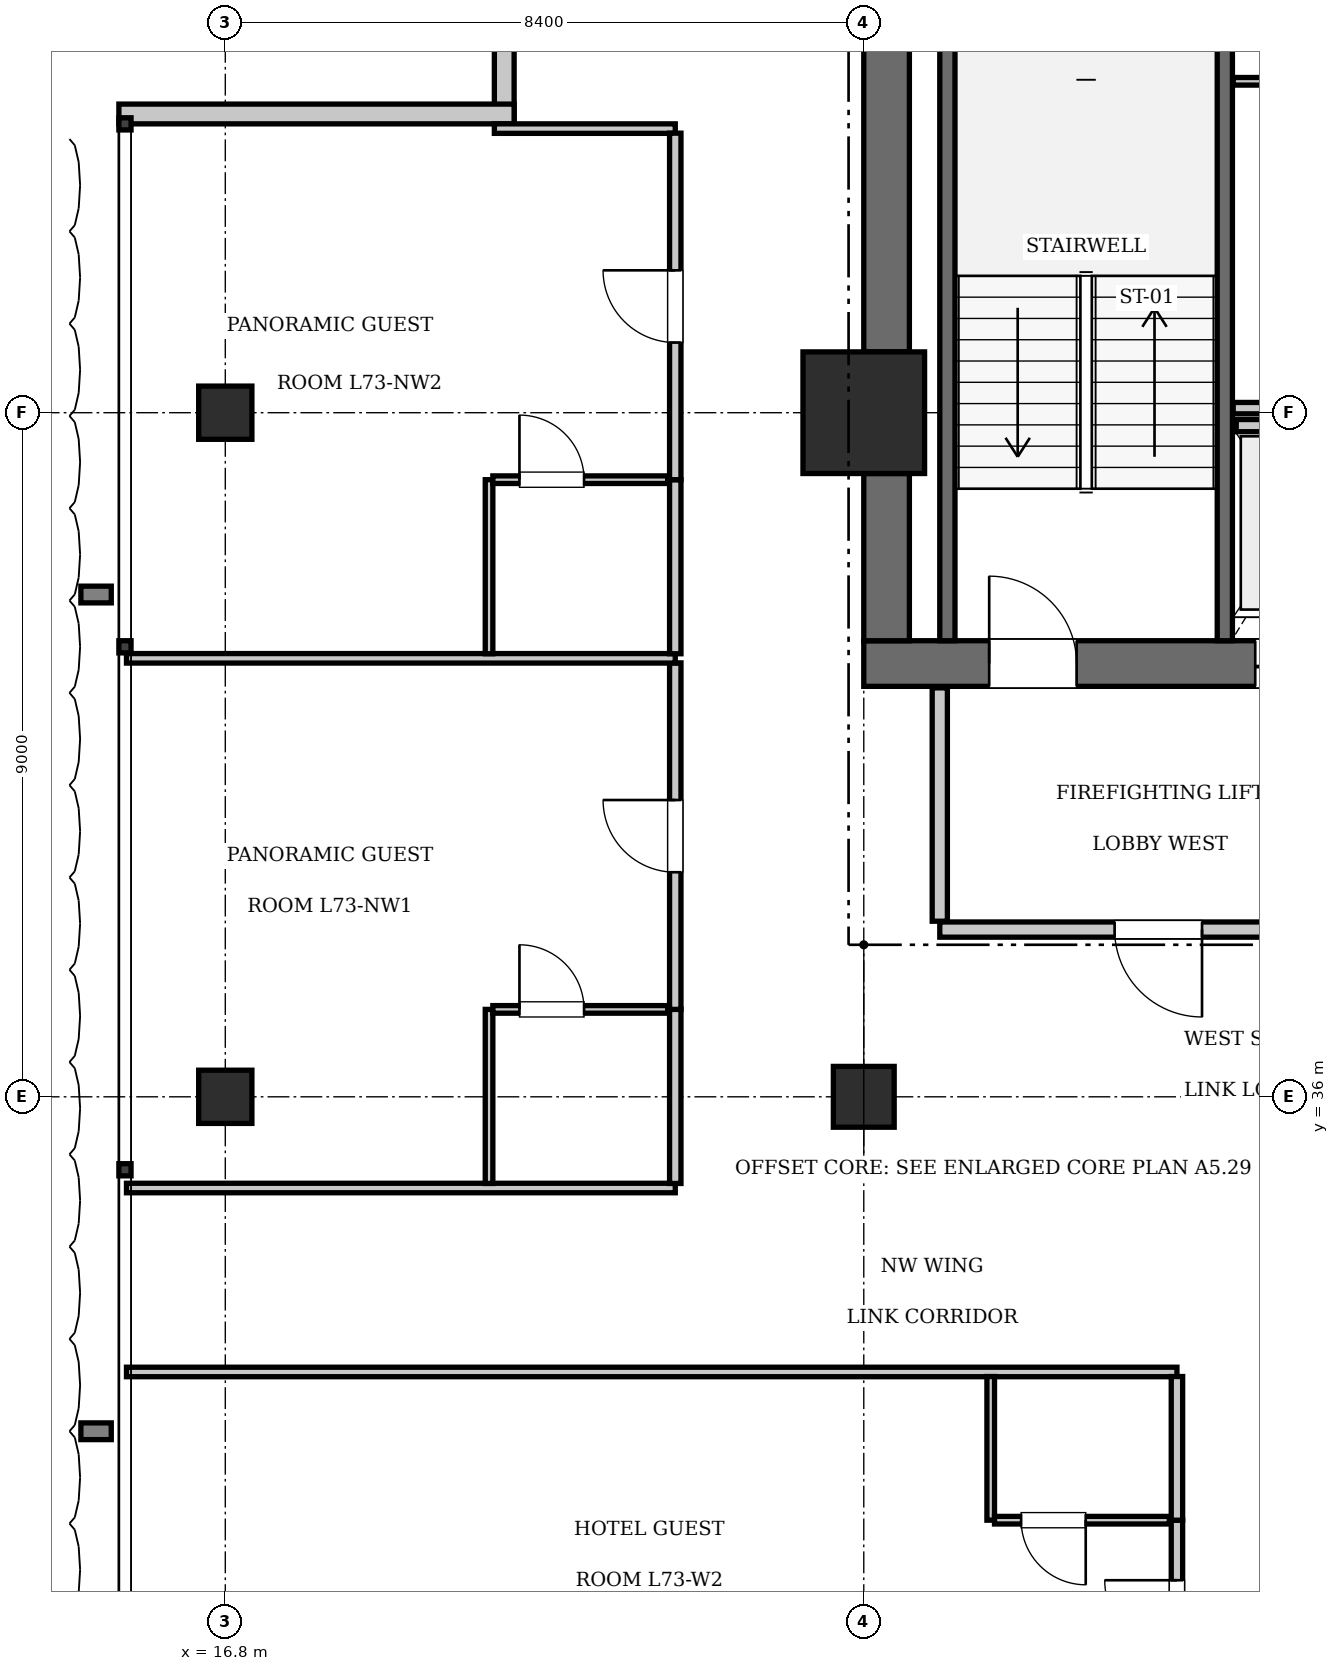
"""IFC4 building model, lengths in metres.
Left out: names, types, materials, properties, quantities, classifications, styles, units other than length and angle.
Written with IfcOpenShell. Run it as: python <this file> out.ifc"""

import sys

from ifc_helpers import new_model, si_unit, direction, frame, frame_2d, origin, origin_2d, place, context, subcontext, project, spatial, rectangle, extrude, element, fill, save


model = new_model("IFC4")
c1 = context("Model", 3, precision=1e-05, world=origin(), true_north=direction((0.0, 1.0)))
c2 = subcontext(c1, "Body", "Model", "MODEL_VIEW")
j1 = project(units=[si_unit("LENGTHUNIT", "METRE"), si_unit("PLANEANGLEUNIT", "RADIAN")], contexts=[c1])
p1 = place(None, origin())
s1 = spatial("IfcSite", under=j1, at=p1, CompositionType="ELEMENT")
p2 = place(p1, origin())
s2 = spatial("IfcBuilding", under=s1, at=p2, CompositionType="ELEMENT")
p3 = place(p2, frame((0.0, 0.0, 297.15)))
s3 = spatial("IfcBuildingStorey", under=s2, at=p3, CompositionType="ELEMENT", Elevation=297.15)
p4 = place(p3, frame((25.2, 45.0, 0.0), z_axis=(0.0, 0.0, 1.0), x_axis=(1.0, 0.0, 0.0)))
e1 = element("IfcColumn", 1, at=p4, inside=s3, PredefinedType="COLUMN", context=c2, shape_type="SweptSolid", body=[
    extrude(rectangle(XDim=1.6, YDim=1.6, at=origin_2d()), origin(), (0.0, 0.0, 1.0), 3.85),
])
p5 = place(p3, frame((25.2, 41.7, 0.0), z_axis=(0.0, 0.0, 1.0), x_axis=(1.0, 0.0, 0.0)))
e2 = element("IfcWall", 2, at=p5, inside=s3, PredefinedType="SHEAR", context=c2, shape_type="SweptSolid", body=[
    extrude(rectangle(XDim=6.8, YDim=0.6, at=frame_2d((3.4, 0.0))), origin(), (0.0, 0.0, 1.0), 3.85),
])
p6 = place(p5, frame((1.65, 0.0, 0.0)))
e3 = element("IfcOpeningElement", 3, at=p6, cuts=e2, PredefinedType="OPENING", context=c2, shape_type="SweptSolid", body=[
    extrude(rectangle(XDim=1.15, YDim=2.15, at=frame_2d((0.575, 1.075))), frame((0.0, 0.31, 0.0), z_axis=(0.0, -1.0, 0.0), x_axis=(1.0, 0.0, 0.0)), (0.0, 0.0, 1.0), 0.62),
])
p7 = place(p5, frame((5.15, 0.0, 0.0)))
e4 = element("IfcOpeningElement", 4, at=p7, cuts=e2, PredefinedType="OPENING", context=c2, shape_type="SweptSolid", body=[
    extrude(rectangle(XDim=1.1, YDim=2.2, at=frame_2d((0.55, 1.1))), frame((0.0, 0.31, 0.0), z_axis=(0.0, -1.0, 0.0), x_axis=(1.0, 0.0, 0.0)), (0.0, 0.0, 1.0), 0.62),
])
p8 = place(p3, frame((25.5, 42.0, 0.0), z_axis=(0.0, 0.0, 1.0), x_axis=(0.0, 1.0, 0.0)))
e5 = element("IfcWall", 5, at=p8, inside=s3, PredefinedType="SHEAR", context=c2, shape_type="SweptSolid", body=[
    extrude(rectangle(XDim=2.2, YDim=0.6, at=frame_2d((1.1, 0.0))), origin(), (0.0, 0.0, 1.0), 3.85),
])
p9 = place(p3, frame((25.5, 45.8, 0.0), z_axis=(0.0, 0.0, 1.0), x_axis=(0.0, 1.0, 0.0)))
e6 = element("IfcWall", 6, at=p9, inside=s3, PredefinedType="SHEAR", context=c2, shape_type="SweptSolid", body=[
    extrude(rectangle(XDim=7.6, YDim=0.6, at=frame_2d((3.8, 0.0))), origin(), (0.0, 0.0, 1.0), 3.85),
])
p10 = place(p3, frame((25.2, 36.0, 0.0), z_axis=(0.0, 0.0, 1.0), x_axis=(1.0, 0.0, 0.0)))
e7 = element("IfcColumn", 7, at=p10, inside=s3, PredefinedType="COLUMN", context=c2, shape_type="SweptSolid", body=[
    extrude(rectangle(XDim=0.8, YDim=0.8, at=origin_2d()), origin(), (0.0, 0.0, 1.0), 3.85),
])
for number, where, z_axis, x_axis in (
    (8, (16.8, 36.0, 0.0), (0.0, 0.0, 1.0), (1.0, 0.0, 0.0)),
    (9, (16.8, 45.0, 0.0), (0.0, 0.0, 1.0), (1.0, 0.0, 0.0)),
):
    element("IfcColumn", number, at=place(p3, frame(where, z_axis=z_axis, x_axis=x_axis)), inside=s3, PredefinedType="COLUMN", context=c2, shape_type="SweptSolid", body=[
        extrude(rectangle(XDim=0.7, YDim=0.7, at=origin_2d()), origin(), (0.0, 0.0, 1.0), 3.85),
    ])
p11 = place(p3, frame((29.95, 42.0, 0.0), z_axis=(0.0, 0.0, 1.0), x_axis=(0.0, 1.0, 0.0)))
e10 = element("IfcWall", 10, at=p11, inside=s3, PredefinedType="SOLIDWALL", context=c2, shape_type="SweptSolid", body=[
    extrude(rectangle(XDim=9.15, YDim=0.2, at=frame_2d((4.575, 0.0))), origin(), (0.0, 0.0, 1.0), 3.61),
])
p12 = place(p3, frame((26.3, 42.0, 0.0), z_axis=(0.0, 0.0, 1.0), x_axis=(0.0, 1.0, 0.0)))
e11 = element("IfcWall", 11, at=p12, inside=s3, PredefinedType="SOLIDWALL", context=c2, shape_type="SweptSolid", body=[
    extrude(rectangle(XDim=9.12, YDim=0.2, at=frame_2d((4.56, 0.0))), origin(), (0.0, 0.0, 1.0), 3.61),
])
p13 = place(p3, frame((30.1, 44.83, 0.0), z_axis=(0.0, 0.0, 1.0), x_axis=(1.0, 0.0, 0.0)))
e12 = element("IfcWall", 12, at=p13, inside=s3, PredefinedType="SOLIDWALL", context=c2, shape_type="SweptSolid", body=[
    extrude(rectangle(XDim=1.6, YDim=0.16, at=frame_2d((0.8, 0.0))), origin(), (0.0, 0.0, 1.0), 3.61),
])
p14 = place(p3, frame((20.47, 48.8, 0.0), z_axis=(0.0, 0.0, 1.0), x_axis=(0.0, 1.0, 0.0)))
e13 = element("IfcWall", 13, at=p14, inside=s3, PredefinedType="SOLIDWALL", context=c2, shape_type="SweptSolid", body=[
    extrude(rectangle(XDim=5.2, YDim=0.26, at=frame_2d((2.6, 0.0))), origin(), (0.0, 0.0, 1.0), 3.61),
])
p15 = place(p3, frame((15.4, 48.93, 0.0), z_axis=(0.0, 0.0, 1.0), x_axis=(1.0, 0.0, 0.0)))
e14 = element("IfcWall", 14, at=p15, inside=s3, PredefinedType="SOLIDWALL", context=c2, shape_type="SweptSolid", body=[
    extrude(rectangle(XDim=5.2, YDim=0.26, at=frame_2d((2.6, 0.0))), origin(), (0.0, 0.0, 1.0), 3.61),
])
p16 = place(p3, frame((26.2, 38.2, 0.0), z_axis=(0.0, 0.0, 1.0), x_axis=(1.0, 0.0, 0.0)))
e15 = element("IfcWall", 15, at=p16, inside=s3, PredefinedType="PARTITIONING", context=c2, shape_type="SweptSolid", body=[
    extrude(rectangle(XDim=5.8, YDim=0.2, at=frame_2d((2.9, 0.0))), origin(), (0.0, 0.0, 1.0), 3.61),
])
p17 = place(p16, frame((2.3, 0.0, 0.0)))
e16 = element("IfcOpeningElement", 16, at=p17, cuts=e15, PredefinedType="OPENING", context=c2, shape_type="SweptSolid", body=[
    extrude(rectangle(XDim=1.15, YDim=2.15, at=frame_2d((0.575, 1.075))), frame((0.0, 0.11, 0.0), z_axis=(0.0, -1.0, 0.0), x_axis=(1.0, 0.0, 0.0)), (0.0, 0.0, 1.0), 0.22),
])
p18 = place(p3, frame((26.2, 38.31, 0.0), z_axis=(0.0, 0.0, 1.0), x_axis=(0.0, 1.0, 0.0)))
e17 = element("IfcWall", 17, at=p18, inside=s3, PredefinedType="PARTITIONING", context=c2, shape_type="SweptSolid", body=[
    extrude(rectangle(XDim=3.07, YDim=0.2, at=frame_2d((1.535, 0.0))), origin(), (0.0, 0.0, 1.0), 3.61),
])
p19 = place(p3, frame((30.06, 45.06, 0.0), z_axis=(0.0, 0.0, 1.0), x_axis=(1.0, 0.0, 0.0)))
e18 = element("IfcWall", 18, at=p19, inside=s3, PredefinedType="PARTITIONING", context=c2, shape_type="SweptSolid", body=[
    extrude(rectangle(XDim=3.18, YDim=0.15, at=frame_2d((1.59, 0.0))), origin(), (0.0, 0.0, 1.0), 3.61),
])
p20 = place(p3, frame((30.06, 49.36, 0.0), z_axis=(0.0, 0.0, 1.0), x_axis=(1.0, 0.0, 0.0)))
e19 = element("IfcWall", 19, at=p20, inside=s3, PredefinedType="PARTITIONING", context=c2, shape_type="SweptSolid", body=[
    extrude(rectangle(XDim=3.18, YDim=0.1, at=frame_2d((1.59, 0.0))), origin(), (0.0, 0.0, 1.0), 3.61),
])
p21 = place(p20, frame((1.95, 0.0, 0.0)))
e20 = element("IfcOpeningElement", 20, at=p21, cuts=e19, PredefinedType="OPENING", context=c2, shape_type="SweptSolid", body=[
    extrude(rectangle(XDim=0.8, YDim=2.05, at=frame_2d((0.4, 1.025))), frame((0.0, 0.06, 0.0), z_axis=(0.0, -1.0, 0.0), x_axis=(1.0, 0.0, 0.0)), (0.0, 0.0, 1.0), 0.12),
])
p22 = place(p3, frame((15.5, 32.38, 0.0), z_axis=(0.0, 0.0, 1.0), x_axis=(1.0, 0.0, 0.0)))
e21 = element("IfcWall", 21, at=p22, inside=s3, PredefinedType="PARTITIONING", context=c2, shape_type="SweptSolid", body=[
    extrude(rectangle(XDim=13.82, YDim=0.125, at=frame_2d((6.91, 0.0))), origin(), (0.0, 0.0, 1.0), 3.61),
])
p23 = place(p3, frame((29.32, 27.9, 0.0), z_axis=(0.0, 0.0, 1.0), x_axis=(0.0, 1.0, 0.0)))
e22 = element("IfcWall", 22, at=p23, inside=s3, PredefinedType="PARTITIONING", context=c2, shape_type="SweptSolid", body=[
    extrude(rectangle(XDim=2.53, YDim=0.15, at=frame_2d((1.265, 0.0))), origin(), (0.0, 0.0, 1.0), 3.61),
])
p24 = place(p23, frame((0.79, 0.0, 0.0)))
e23 = element("IfcOpeningElement", 23, at=p24, cuts=e22, PredefinedType="OPENING", context=c2, shape_type="SweptSolid", body=[
    extrude(rectangle(XDim=0.95, YDim=2.15, at=frame_2d((0.475, 1.075))), frame((0.0, 0.085, 0.0), z_axis=(0.0, -1.0, 0.0), x_axis=(1.0, 0.0, 0.0)), (0.0, 0.0, 1.0), 0.17),
])
p25 = place(p3, frame((29.32, 30.43, 0.0), z_axis=(0.0, 0.0, 1.0), x_axis=(0.0, 1.0, 0.0)))
e24 = element("IfcWall", 24, at=p25, inside=s3, PredefinedType="PARTITIONING", context=c2, shape_type="SweptSolid", body=[
    extrude(rectangle(XDim=1.89, YDim=0.15, at=frame_2d((0.945, 0.0))), origin(), (0.0, 0.0, 1.0), 3.61),
])
p26 = place(p3, frame((26.87, 30.43, 0.0), z_axis=(0.0, 0.0, 1.0), x_axis=(0.0, 1.0, 0.0)))
e25 = element("IfcWall", 25, at=p26, inside=s3, PredefinedType="PARTITIONING", context=c2, shape_type="SweptSolid", body=[
    extrude(rectangle(XDim=1.89, YDim=0.1, at=frame_2d((0.945, 0.0))), origin(), (0.0, 0.0, 1.0), 3.61),
])
p27 = place(p3, frame((26.92, 30.43, 0.0), z_axis=(0.0, 0.0, 1.0), x_axis=(1.0, 0.0, 0.0)))
e26 = element("IfcWall", 26, at=p27, inside=s3, PredefinedType="PARTITIONING", context=c2, shape_type="SweptSolid", body=[
    extrude(rectangle(XDim=2.3, YDim=0.1, at=frame_2d((1.15, 0.0))), origin(), (0.0, 0.0, 1.0), 3.61),
])
p28 = place(p27, frame((0.35, 0.0, 0.0)))
e27 = element("IfcOpeningElement", 27, at=p28, cuts=e26, PredefinedType="OPENING", context=c2, shape_type="SweptSolid", body=[
    extrude(rectangle(XDim=0.85, YDim=2.1, at=frame_2d((0.425, 1.05))), frame((0.0, 0.06, 0.0), z_axis=(0.0, -1.0, 0.0), x_axis=(1.0, 0.0, 0.0)), (0.0, 0.0, 1.0), 0.12),
])
p29 = place(p3, frame((15.5, 34.8, 0.0), z_axis=(0.0, 0.0, 1.0), x_axis=(1.0, 0.0, 0.0)))
e28 = element("IfcWall", 28, at=p29, inside=s3, PredefinedType="PARTITIONING", context=c2, shape_type="SweptSolid", body=[
    extrude(rectangle(XDim=7.22, YDim=0.125, at=frame_2d((3.61, 0.0))), origin(), (0.0, 0.0, 1.0), 3.61),
])
p30 = place(p3, frame((20.34, 48.738, 0.0), z_axis=(0.0, 0.0, 1.0), x_axis=(1.0, 0.0, 0.0)))
e29 = element("IfcWall", 29, at=p30, inside=s3, PredefinedType="PARTITIONING", context=c2, shape_type="SweptSolid", body=[
    extrude(rectangle(XDim=2.38, YDim=0.125, at=frame_2d((1.19, 0.0))), origin(), (0.0, 0.0, 1.0), 3.61),
])
p31 = place(p3, frame((22.72, 34.86, 0.0), z_axis=(0.0, 0.0, 1.0), x_axis=(0.0, 1.0, 0.0)))
e30 = element("IfcWall", 30, at=p31, inside=s3, PredefinedType="PARTITIONING", context=c2, shape_type="SweptSolid", body=[
    extrude(rectangle(XDim=2.29, YDim=0.15, at=frame_2d((1.145, 0.0))), origin(), (0.0, 0.0, 1.0), 3.61),
])
p32 = place(p3, frame((22.72, 37.15, 0.0), z_axis=(0.0, 0.0, 1.0), x_axis=(0.0, 1.0, 0.0)))
e31 = element("IfcWall", 31, at=p32, inside=s3, PredefinedType="PARTITIONING", context=c2, shape_type="SweptSolid", body=[
    extrude(rectangle(XDim=4.559, YDim=0.15, at=frame_2d((2.279, 0.0))), origin(), (0.0, 0.0, 1.0), 3.61),
])
p33 = place(p32, frame((1.804, 0.0, 0.0)))
e32 = element("IfcOpeningElement", 32, at=p33, cuts=e31, PredefinedType="OPENING", context=c2, shape_type="SweptSolid", body=[
    extrude(rectangle(XDim=0.95, YDim=2.15, at=frame_2d((0.475, 1.075))), frame((0.0, 0.085, 0.0), z_axis=(0.0, -1.0, 0.0), x_axis=(1.0, 0.0, 0.0)), (0.0, 0.0, 1.0), 0.17),
])
p34 = place(p3, frame((20.27, 34.86, 0.0), z_axis=(0.0, 0.0, 1.0), x_axis=(0.0, 1.0, 0.0)))
e33 = element("IfcWall", 33, at=p34, inside=s3, PredefinedType="PARTITIONING", context=c2, shape_type="SweptSolid", body=[
    extrude(rectangle(XDim=2.29, YDim=0.1, at=frame_2d((1.145, 0.0))), origin(), (0.0, 0.0, 1.0), 3.61),
])
p35 = place(p3, frame((20.32, 37.15, 0.0), z_axis=(0.0, 0.0, 1.0), x_axis=(1.0, 0.0, 0.0)))
e34 = element("IfcWall", 34, at=p35, inside=s3, PredefinedType="PARTITIONING", context=c2, shape_type="SweptSolid", body=[
    extrude(rectangle(XDim=2.3, YDim=0.1, at=frame_2d((1.15, 0.0))), origin(), (0.0, 0.0, 1.0), 3.61),
])
p36 = place(p35, frame((0.35, 0.0, 0.0)))
e35 = element("IfcOpeningElement", 35, at=p36, cuts=e34, PredefinedType="OPENING", context=c2, shape_type="SweptSolid", body=[
    extrude(rectangle(XDim=0.85, YDim=2.1, at=frame_2d((0.425, 1.05))), frame((0.0, 0.06, 0.0), z_axis=(0.0, -1.0, 0.0), x_axis=(1.0, 0.0, 0.0)), (0.0, 0.0, 1.0), 0.12),
])
p37 = place(p3, frame((15.5, 41.769, 0.0), z_axis=(0.0, 0.0, 1.0), x_axis=(1.0, 0.0, 0.0)))
e36 = element("IfcWall", 36, at=p37, inside=s3, PredefinedType="PARTITIONING", context=c2, shape_type="SweptSolid", body=[
    extrude(rectangle(XDim=7.22, YDim=0.125, at=frame_2d((3.61, 0.0))), origin(), (0.0, 0.0, 1.0), 3.61),
])
p38 = place(p3, frame((22.72, 41.829, 0.0), z_axis=(0.0, 0.0, 1.0), x_axis=(0.0, 1.0, 0.0)))
e37 = element("IfcWall", 37, at=p38, inside=s3, PredefinedType="PARTITIONING", context=c2, shape_type="SweptSolid", body=[
    extrude(rectangle(XDim=2.29, YDim=0.15, at=frame_2d((1.145, 0.0))), origin(), (0.0, 0.0, 1.0), 3.61),
])
p39 = place(p3, frame((22.72, 44.119, 0.0), z_axis=(0.0, 0.0, 1.0), x_axis=(0.0, 1.0, 0.0)))
e38 = element("IfcWall", 38, at=p39, inside=s3, PredefinedType="PARTITIONING", context=c2, shape_type="SweptSolid", body=[
    extrude(rectangle(XDim=4.559, YDim=0.15, at=frame_2d((2.279, 0.0))), origin(), (0.0, 0.0, 1.0), 3.61),
])
p40 = place(p39, frame((1.804, 0.0, 0.0)))
e39 = element("IfcOpeningElement", 39, at=p40, cuts=e38, PredefinedType="OPENING", context=c2, shape_type="SweptSolid", body=[
    extrude(rectangle(XDim=0.95, YDim=2.15, at=frame_2d((0.475, 1.075))), frame((0.0, 0.085, 0.0), z_axis=(0.0, -1.0, 0.0), x_axis=(1.0, 0.0, 0.0)), (0.0, 0.0, 1.0), 0.17),
])
p41 = place(p3, frame((20.27, 41.829, 0.0), z_axis=(0.0, 0.0, 1.0), x_axis=(0.0, 1.0, 0.0)))
e40 = element("IfcWall", 40, at=p41, inside=s3, PredefinedType="PARTITIONING", context=c2, shape_type="SweptSolid", body=[
    extrude(rectangle(XDim=2.29, YDim=0.1, at=frame_2d((1.145, 0.0))), origin(), (0.0, 0.0, 1.0), 3.61),
])
p42 = place(p3, frame((20.32, 44.119, 0.0), z_axis=(0.0, 0.0, 1.0), x_axis=(1.0, 0.0, 0.0)))
e41 = element("IfcWall", 41, at=p42, inside=s3, PredefinedType="PARTITIONING", context=c2, shape_type="SweptSolid", body=[
    extrude(rectangle(XDim=2.3, YDim=0.1, at=frame_2d((1.15, 0.0))), origin(), (0.0, 0.0, 1.0), 3.61),
])
p43 = place(p42, frame((0.35, 0.0, 0.0)))
e42 = element("IfcOpeningElement", 42, at=p43, cuts=e41, PredefinedType="OPENING", context=c2, shape_type="SweptSolid", body=[
    extrude(rectangle(XDim=0.85, YDim=2.1, at=frame_2d((0.425, 1.05))), frame((0.0, 0.06, 0.0), z_axis=(0.0, -1.0, 0.0), x_axis=(1.0, 0.0, 0.0)), (0.0, 0.0, 1.0), 0.12),
])
p44 = place(p6, origin())
e43 = element("IfcDoor", 43, at=p44, inside=s3, OperationType="SINGLE_SWING_LEFT", PredefinedType="DOOR", context=c2, shape_type="SweptSolid", body=[
    extrude(rectangle(XDim=1.15, YDim=2.15, at=frame_2d((0.575, 1.075))), frame((0.0, 0.025, 0.0), z_axis=(0.0, -1.0, 0.0), x_axis=(1.0, 0.0, 0.0)), (0.0, 0.0, 1.0), 0.05),
])
fill(e3, e43)
p45 = place(p7, frame((1.1, 0.0, 0.0), z_axis=(0.0, 0.0, 1.0), x_axis=(-1.0, 0.0, 0.0)))
e44 = element("IfcDoor", 44, at=p45, inside=s3, OperationType="SLIDING_TO_LEFT", PredefinedType="DOOR", context=c2, shape_type="SweptSolid", body=[
    extrude(rectangle(XDim=1.1, YDim=2.2, at=frame_2d((0.55, 1.1))), frame((0.0, 0.025, 0.0), z_axis=(0.0, -1.0, 0.0), x_axis=(1.0, 0.0, 0.0)), (0.0, 0.0, 1.0), 0.05),
])
fill(e4, e44)
p46 = place(p17, frame((1.15, 0.0, 0.0), z_axis=(0.0, 0.0, 1.0), x_axis=(-1.0, 0.0, 0.0)))
e45 = element("IfcDoor", 45, at=p46, inside=s3, OperationType="SINGLE_SWING_LEFT", PredefinedType="DOOR", context=c2, shape_type="SweptSolid", body=[
    extrude(rectangle(XDim=1.15, YDim=2.15, at=frame_2d((0.575, 1.075))), frame((0.0, 0.025, 0.0), z_axis=(0.0, -1.0, 0.0), x_axis=(1.0, 0.0, 0.0)), (0.0, 0.0, 1.0), 0.05),
])
fill(e16, e45)
p47 = place(p28, frame((0.85, 0.0, 0.0), z_axis=(0.0, 0.0, 1.0), x_axis=(-1.0, 0.0, 0.0)))
e46 = element("IfcDoor", 46, at=p47, inside=s3, OperationType="SINGLE_SWING_LEFT", PredefinedType="DOOR", context=c2, shape_type="SweptSolid", body=[
    extrude(rectangle(XDim=0.85, YDim=2.1, at=frame_2d((0.425, 1.05))), frame((0.0, 0.025, 0.0), z_axis=(0.0, -1.0, 0.0), x_axis=(1.0, 0.0, 0.0)), (0.0, 0.0, 1.0), 0.05),
])
fill(e27, e46)
p48 = place(p24, origin())
e47 = element("IfcDoor", 47, at=p48, inside=s3, OperationType="SINGLE_SWING_RIGHT", PredefinedType="DOOR", context=c2, shape_type="SweptSolid", body=[
    extrude(rectangle(XDim=0.95, YDim=2.15, at=frame_2d((0.475, 1.075))), frame((0.0, 0.025, 0.0), z_axis=(0.0, -1.0, 0.0), x_axis=(1.0, 0.0, 0.0)), (0.0, 0.0, 1.0), 0.05),
])
fill(e23, e47)
p49 = place(p36, origin())
e48 = element("IfcDoor", 48, at=p49, inside=s3, OperationType="SINGLE_SWING_LEFT", PredefinedType="DOOR", context=c2, shape_type="SweptSolid", body=[
    extrude(rectangle(XDim=0.85, YDim=2.1, at=frame_2d((0.425, 1.05))), frame((0.0, 0.025, 0.0), z_axis=(0.0, -1.0, 0.0), x_axis=(1.0, 0.0, 0.0)), (0.0, 0.0, 1.0), 0.05),
])
fill(e35, e48)
p50 = place(p33, origin())
e49 = element("IfcDoor", 49, at=p50, inside=s3, OperationType="SINGLE_SWING_RIGHT", PredefinedType="DOOR", context=c2, shape_type="SweptSolid", body=[
    extrude(rectangle(XDim=0.95, YDim=2.15, at=frame_2d((0.475, 1.075))), frame((0.0, 0.025, 0.0), z_axis=(0.0, -1.0, 0.0), x_axis=(1.0, 0.0, 0.0)), (0.0, 0.0, 1.0), 0.05),
])
fill(e32, e49)
p51 = place(p43, origin())
e50 = element("IfcDoor", 50, at=p51, inside=s3, OperationType="SINGLE_SWING_LEFT", PredefinedType="DOOR", context=c2, shape_type="SweptSolid", body=[
    extrude(rectangle(XDim=0.85, YDim=2.1, at=frame_2d((0.425, 1.05))), frame((0.0, 0.025, 0.0), z_axis=(0.0, -1.0, 0.0), x_axis=(1.0, 0.0, 0.0)), (0.0, 0.0, 1.0), 0.05),
])
fill(e42, e50)
p52 = place(p40, origin())
e51 = element("IfcDoor", 51, at=p52, inside=s3, OperationType="SINGLE_SWING_RIGHT", PredefinedType="DOOR", context=c2, shape_type="SweptSolid", body=[
    extrude(rectangle(XDim=0.95, YDim=2.15, at=frame_2d((0.475, 1.075))), frame((0.0, 0.025, 0.0), z_axis=(0.0, -1.0, 0.0), x_axis=(1.0, 0.0, 0.0)), (0.0, 0.0, 1.0), 0.05),
])
fill(e39, e51)
save(model, sys.argv[1])
